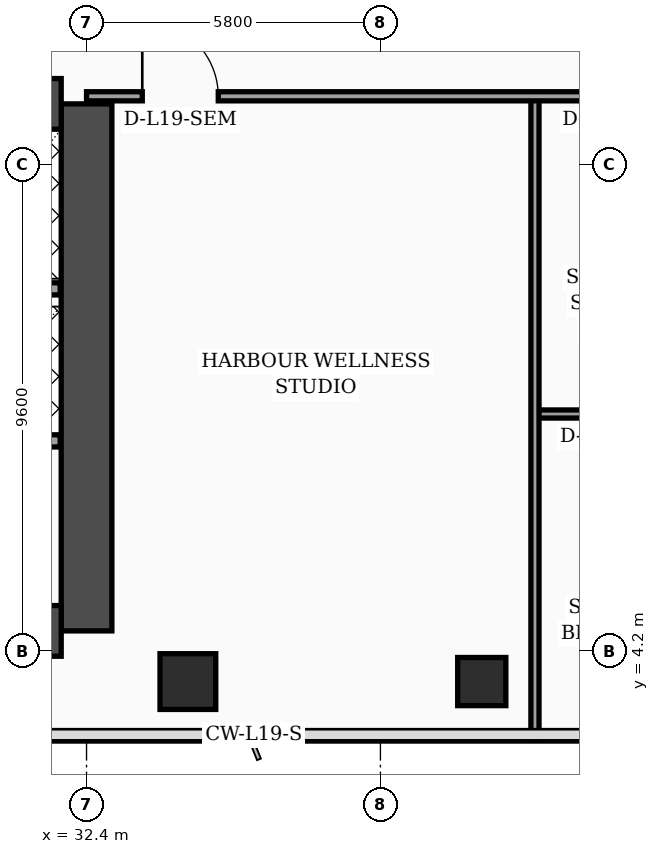
"""IFC4 building model, lengths in metres.
Left out: names, types, materials, properties, quantities, classifications, styles, units other than length and angle.
Written with IfcOpenShell. Run it as: python <this file> out.ifc"""

import sys

from ifc_helpers import new_model, si_unit, direction, frame, frame_2d, origin, origin_2d, place, context, subcontext, project, spatial, rectangle, hollow_rectangle, extrude, element, fill, save


model = new_model("IFC4")
c1 = context("Model", 3, precision=1e-05, world=origin(), true_north=direction((0.0, 1.0)))
c2 = subcontext(c1, "Body", "Model", "MODEL_VIEW")
j1 = project(units=[si_unit("LENGTHUNIT", "METRE"), si_unit("PLANEANGLEUNIT", "RADIAN")], contexts=[c1])
p1 = place(None, origin())
s1 = spatial("IfcSite", under=j1, at=p1, CompositionType="ELEMENT")
p2 = place(p1, origin())
s2 = spatial("IfcBuilding", under=s1, at=p2, CompositionType="ELEMENT")
p3 = place(p2, frame((0.0, 0.0, 81.2)))
s3 = spatial("IfcBuildingStorey", under=s2, at=p3, CompositionType="ELEMENT", Elevation=81.2)
p4 = place(p3, frame((32.4, 4.6, 0.0), z_axis=(0.0, 0.0, 1.0), x_axis=(0.0, 1.0, 0.0)))
e1 = element("IfcWall", 1, at=p4, inside=s3, PredefinedType="SHEAR", context=c2, shape_type="SweptSolid", body=[
    extrude(rectangle(XDim=10.4, YDim=1.0, at=frame_2d((5.2, 0.0))), origin(), (0.0, 0.0, 1.0), 3.56),
])
p5 = place(p3, frame((22.1, 15.0, 0.0), z_axis=(0.0, 0.0, 1.0), x_axis=(1.0, 0.0, 0.0)))
e2 = element("IfcWall", 2, at=p5, inside=s3, PredefinedType="SHEAR", context=c2, shape_type="SweptSolid", body=[
    extrude(rectangle(XDim=9.8, YDim=1.0, at=frame_2d((4.9, 0.0))), origin(), (0.0, 0.0, 1.0), 3.56),
])
p6 = place(p5, frame((4.8, 0.0, 0.0)))
e3 = element("IfcOpeningElement", 3, at=p6, cuts=e2, PredefinedType="OPENING", context=c2, shape_type="SweptSolid", body=[
    extrude(rectangle(XDim=1.1, YDim=2.2, at=frame_2d((0.55, 1.1))), frame((0.0, 0.51, 0.0), z_axis=(0.0, -1.0, 0.0), x_axis=(1.0, 0.0, 0.0)), (0.0, 0.0, 1.0), 1.02),
])
p7 = place(p3, frame((22.1, 4.6, 0.0), z_axis=(0.0, 0.0, 1.0), x_axis=(1.0, 0.0, 0.0)))
e4 = element("IfcWall", 4, at=p7, inside=s3, PredefinedType="SHEAR", context=c2, shape_type="SweptSolid", body=[
    extrude(rectangle(XDim=9.8, YDim=1.0, at=frame_2d((4.9, 0.0))), origin(), (0.0, 0.0, 1.0), 3.56),
])
p8 = place(p3, frame((34.4, 3.6, 0.0), z_axis=(0.0, 0.0, 1.0), x_axis=(1.0, 0.0, 0.0)))
e5 = element("IfcColumn", 5, at=p8, inside=s3, PredefinedType="COLUMN", context=c2, shape_type="SweptSolid", body=[
    extrude(hollow_rectangle(XDim=1.1, YDim=1.1, WallThickness=0.045, at=origin_2d()), origin(), (0.0, 0.0, 1.0), 3.56),
])
p9 = place(p3, frame((40.2, 3.6, 0.0), z_axis=(0.0, 0.0, 1.0), x_axis=(1.0, 0.0, 0.0)))
e6 = element("IfcColumn", 6, at=p9, inside=s3, PredefinedType="COLUMN", context=c2, shape_type="SweptSolid", body=[
    extrude(hollow_rectangle(XDim=0.95, YDim=0.95, WallThickness=0.04, at=origin_2d()), origin(), (0.0, 0.0, 1.0), 3.56),
])
p10 = place(p3, frame((27.02, 11.35, 0.0), z_axis=(0.0, 0.0, 1.0), x_axis=(1.0, 0.0, 0.0)))
e7 = element("IfcWall", 7, at=p10, inside=s3, PredefinedType="SOLIDWALL", context=c2, shape_type="SweptSolid", body=[
    extrude(rectangle(XDim=4.86, YDim=0.24, at=frame_2d((2.43, 0.0))), origin(), (0.0, 0.0, 1.0), 3.56),
])
p11 = place(p10, frame((0.45, 0.0, 0.0)))
e8 = element("IfcOpeningElement", 8, at=p11, cuts=e7, PredefinedType="OPENING", context=c2, shape_type="SweptSolid", body=[
    extrude(rectangle(XDim=1.3, YDim=2.35, at=frame_2d((0.65, 1.175))), frame((0.0, 0.13, 0.0), z_axis=(0.0, -1.0, 0.0), x_axis=(1.0, 0.0, 0.0)), (0.0, 0.0, 1.0), 0.26),
])
p12 = place(p3, frame((27.02, 8.35, 0.0), z_axis=(0.0, 0.0, 1.0), x_axis=(1.0, 0.0, 0.0)))
e9 = element("IfcWall", 9, at=p12, inside=s3, PredefinedType="SOLIDWALL", context=c2, shape_type="SweptSolid", body=[
    extrude(rectangle(XDim=4.86, YDim=0.24, at=frame_2d((2.43, 0.0))), origin(), (0.0, 0.0, 1.0), 3.56),
])
p13 = place(p3, frame((41.25, 8.88, 0.0), z_axis=(0.0, 0.0, 1.0), x_axis=(1.0, 0.0, 0.0)))
e10 = element("IfcWall", 10, at=p13, inside=s3, PredefinedType="PARTITIONING", context=c2, shape_type="SweptSolid", body=[
    extrude(rectangle(XDim=3.19, YDim=0.16, at=frame_2d((1.595, 0.0))), origin(), (0.0, 0.0, 1.0), 3.56),
])
p14 = place(p13, frame((1.11, 0.0, 0.0)))
e11 = element("IfcOpeningElement", 11, at=p14, cuts=e10, PredefinedType="OPENING", context=c2, shape_type="SweptSolid", body=[
    extrude(rectangle(XDim=0.96, YDim=2.2, at=frame_2d((0.48, 1.1))), frame((0.0, 0.09, 0.0), z_axis=(0.0, -1.0, 0.0), x_axis=(1.0, 0.0, 0.0)), (0.0, 0.0, 1.0), 0.18),
])
p15 = place(p3, frame((41.25, 2.44, 0.0), z_axis=(0.0, 0.0, 1.0), x_axis=(0.0, 1.0, 0.0)))
e12 = element("IfcWall", 12, at=p15, inside=s3, PredefinedType="PARTITIONING", context=c2, shape_type="SweptSolid", body=[
    extrude(rectangle(XDim=12.71, YDim=0.16, at=frame_2d((6.355, 0.0))), origin(), (0.0, 0.0, 1.0), 3.04),
])
p16 = place(p3, frame((32.4, 15.15, 0.0), z_axis=(0.0, 0.0, 1.0), x_axis=(1.0, 0.0, 0.0)))
e13 = element("IfcWall", 13, at=p16, inside=s3, PredefinedType="PARTITIONING", context=c2, shape_type="SweptSolid", body=[
    extrude(rectangle(XDim=20.85, YDim=0.18, at=frame_2d((10.425, 0.0))), origin(), (0.0, 0.0, 1.0), 2.84),
])
p17 = place(p16, frame((1.1, 0.0, 0.0)))
e14 = element("IfcOpeningElement", 14, at=p17, cuts=e13, PredefinedType="OPENING", context=c2, shape_type="SweptSolid", body=[
    extrude(rectangle(XDim=1.5, YDim=2.22, at=frame_2d((0.75, 1.11))), frame((0.0, 0.1, 0.0), z_axis=(0.0, -1.0, 0.0), x_axis=(1.0, 0.0, 0.0)), (0.0, 0.0, 1.0), 0.2),
])
p18 = place(p16, frame((9.94, 0.0, 0.0)))
e15 = element("IfcOpeningElement", 15, at=p18, cuts=e13, PredefinedType="OPENING", context=c2, shape_type="SweptSolid", body=[
    extrude(rectangle(XDim=1.02, YDim=2.2, at=frame_2d((0.51, 1.1))), frame((0.0, 0.1, 0.0), z_axis=(0.0, -1.0, 0.0), x_axis=(1.0, 0.0, 0.0)), (0.0, 0.0, 1.0), 0.2),
])
p19 = place(p16, frame((15.92, 0.0, 0.0)))
e16 = element("IfcOpeningElement", 16, at=p19, cuts=e13, PredefinedType="OPENING", context=c2, shape_type="SweptSolid", body=[
    extrude(rectangle(XDim=1.02, YDim=2.2, at=frame_2d((0.51, 1.1))), frame((0.0, 0.1, 0.0), z_axis=(0.0, -1.0, 0.0), x_axis=(1.0, 0.0, 0.0)), (0.0, 0.0, 1.0), 0.2),
])
p20 = place(p17, origin())
e17 = element("IfcDoor", 17, at=p20, inside=s3, OperationType="SINGLE_SWING_LEFT", PredefinedType="DOOR", context=c2, shape_type="SweptSolid", body=[
    extrude(rectangle(XDim=1.5, YDim=2.22, at=frame_2d((0.75, 1.11))), frame((0.0, 0.025, 0.0), z_axis=(0.0, -1.0, 0.0), x_axis=(1.0, 0.0, 0.0)), (0.0, 0.0, 1.0), 0.05),
])
fill(e14, e17)
save(model, sys.argv[1])
